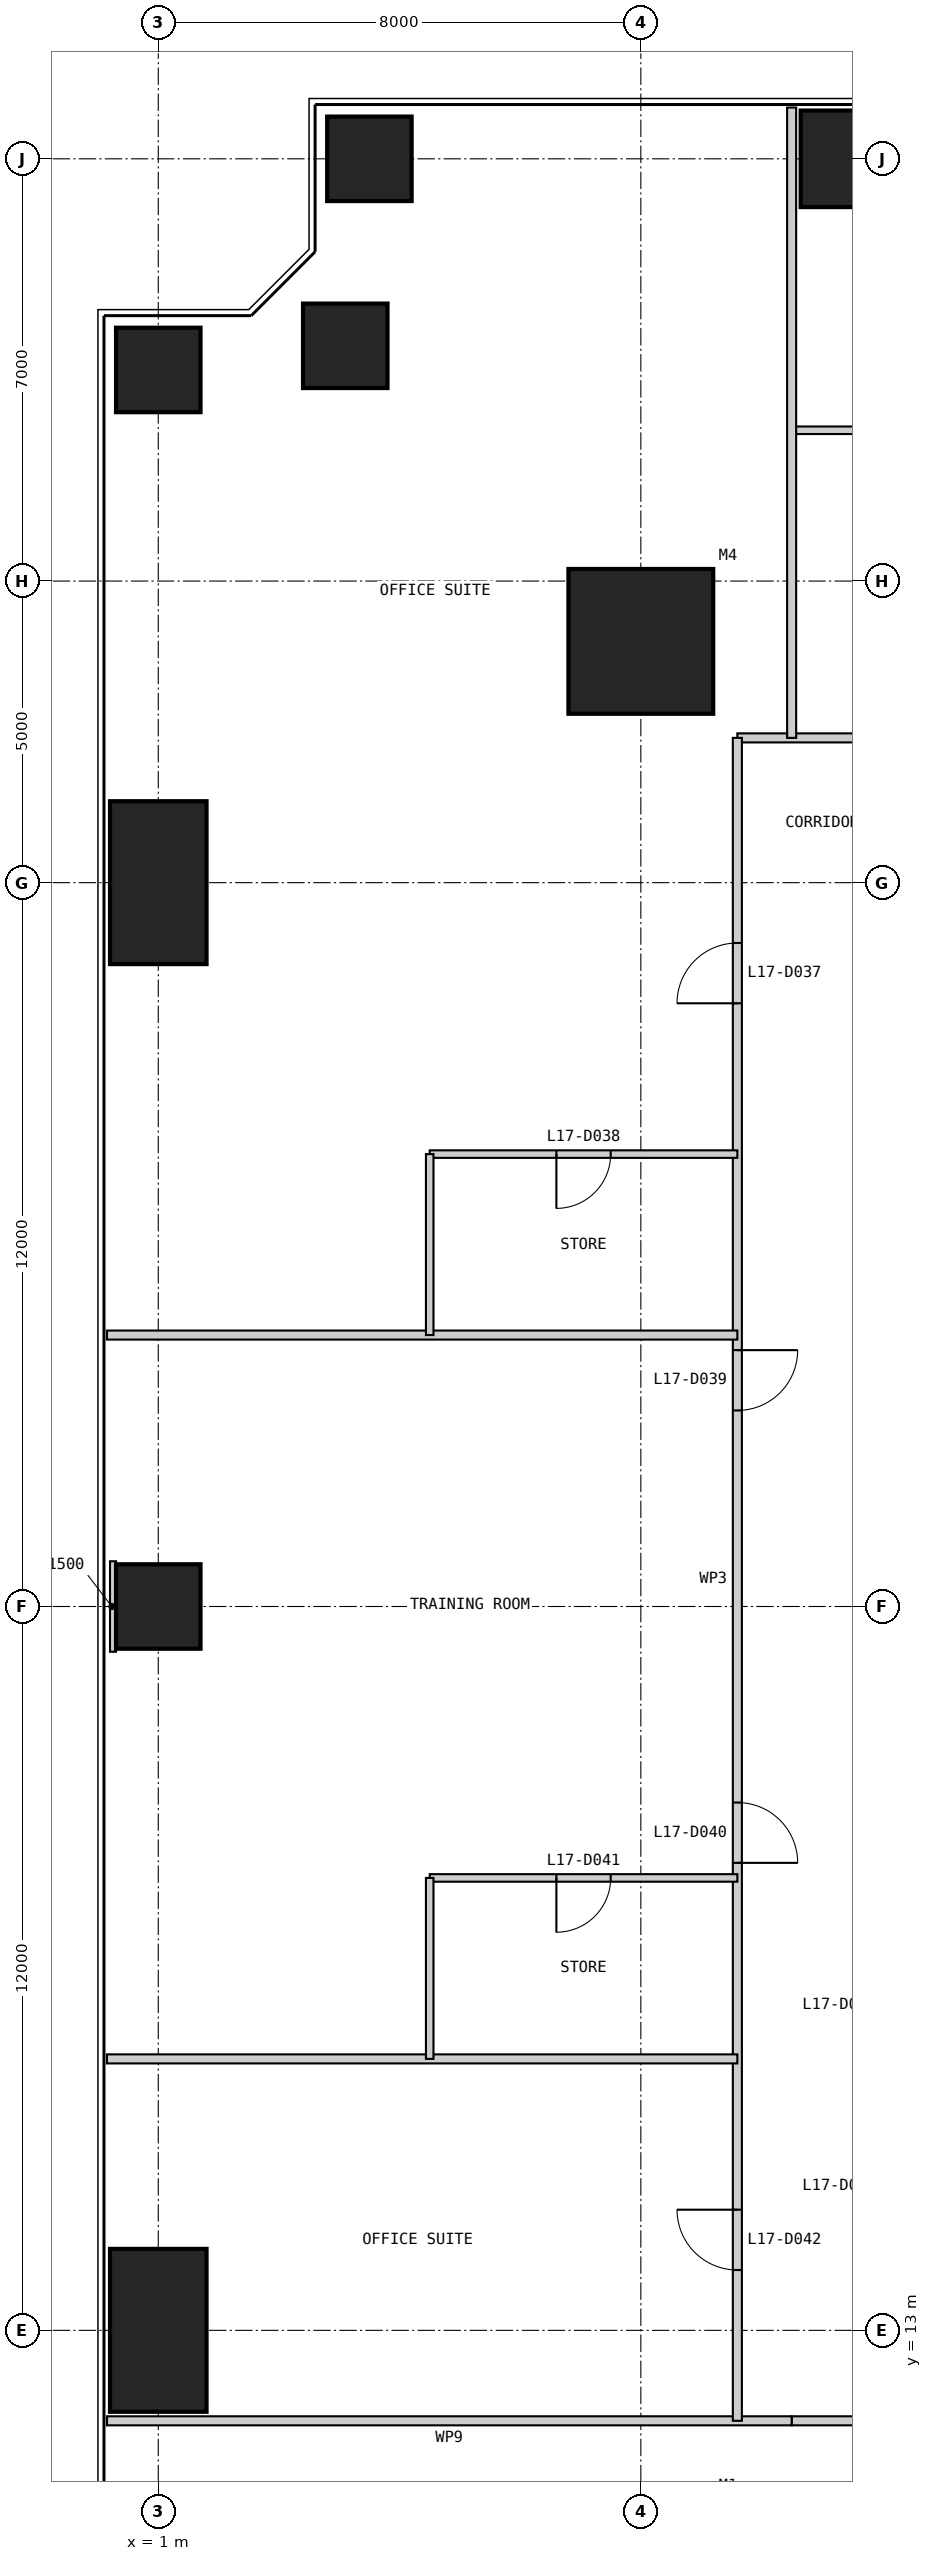
"""IFC4 building model, lengths in metres.
Left out: names, types, materials, properties, quantities, classifications, styles, units other than length and angle.
Written with IfcOpenShell. Run it as: python <this file> out.ifc"""

import sys

from ifc_helpers import new_model, si_unit, direction, frame, frame_2d, origin, origin_2d, place, context, subcontext, project, spatial, rectangle, extrude, element, fill, save


model = new_model("IFC4")
c1 = context("Model", 3, precision=1e-05, world=origin(), true_north=direction((0.0, 1.0)))
c2 = subcontext(c1, "Body", "Model", "MODEL_VIEW")
j1 = project(units=[si_unit("LENGTHUNIT", "METRE"), si_unit("PLANEANGLEUNIT", "RADIAN")], contexts=[c1])
p1 = place(None, origin())
s1 = spatial("IfcSite", under=j1, at=p1, CompositionType="ELEMENT")
p2 = place(p1, origin())
s2 = spatial("IfcBuilding", under=s1, at=p2, CompositionType="ELEMENT")
p3 = place(p2, frame((0.0, 0.0, 75.0)))
s3 = spatial("IfcBuildingStorey", under=s2, at=p3, CompositionType="ELEMENT", Elevation=75.0)
p4 = place(p3, frame((9.0, 41.0, 0.0), z_axis=(0.0, 0.0, 1.0), x_axis=(1.0, 0.0, 0.0)))
e1 = element("IfcColumn", 1, at=p4, inside=s3, PredefinedType="COLUMN", context=c2, shape_type="SweptSolid", body=[
    extrude(rectangle(XDim=2.4, YDim=2.4, at=origin_2d()), origin(), (0.0, 0.0, 1.0), 4.0),
])
p5 = place(p3, frame((13.0, 49.0, 0.0), z_axis=(0.0, 0.0, 1.0), x_axis=(1.0, 0.0, 0.0)))
e2 = element("IfcColumn", 2, at=p5, inside=s3, PredefinedType="COLUMN", context=c2, shape_type="SweptSolid", body=[
    extrude(rectangle(XDim=2.7, YDim=1.6, at=origin_2d()), origin(), (0.0, 0.0, 1.0), 4.0),
])
for number, where, z_axis, x_axis in (
    (3, (4.5, 49.0, 0.0), (0.0, 0.0, 1.0), (1.0, 0.0, 0.0)),
    (4, (4.1, 45.9, 0.0), (0.0, 0.0, 1.0), (1.0, 0.0, 0.0)),
    (5, (1.0, 45.5, 0.0), (0.0, 0.0, 1.0), (1.0, 0.0, 0.0)),
):
    element("IfcColumn", number, at=place(p3, frame(where, z_axis=z_axis, x_axis=x_axis)), inside=s3, PredefinedType="COLUMN", context=c2, shape_type="SweptSolid", body=[
        extrude(rectangle(XDim=1.4, YDim=1.4, at=origin_2d()), origin(), (0.0, 0.0, 1.0), 4.0),
    ])
p6 = place(p3, frame((1.0, 37.0, 0.0), z_axis=(0.0, 0.0, 1.0), x_axis=(1.0, 0.0, 0.0)))
e6 = element("IfcColumn", 6, at=p6, inside=s3, PredefinedType="COLUMN", context=c2, shape_type="SweptSolid", body=[
    extrude(rectangle(XDim=1.6, YDim=2.7, at=origin_2d()), origin(), (0.0, 0.0, 1.0), 4.0),
])
p7 = place(p3, frame((1.0, 25.0, 0.0), z_axis=(0.0, 0.0, 1.0), x_axis=(1.0, 0.0, 0.0)))
e7 = element("IfcColumn", 7, at=p7, inside=s3, PredefinedType="COLUMN", context=c2, shape_type="SweptSolid", body=[
    extrude(rectangle(XDim=1.4, YDim=1.4, at=origin_2d()), origin(), (0.0, 0.0, 1.0), 4.0),
])
p8 = place(p3, frame((1.0, 13.0, 0.0), z_axis=(0.0, 0.0, 1.0), x_axis=(1.0, 0.0, 0.0)))
e8 = element("IfcColumn", 8, at=p8, inside=s3, PredefinedType="COLUMN", context=c2, shape_type="SweptSolid", body=[
    extrude(rectangle(XDim=1.6, YDim=2.7, at=origin_2d()), origin(), (0.0, 0.0, 1.0), 4.0),
])
p9 = place(p3, frame((11.5, 11.5, 0.0), z_axis=(0.0, 0.0, 1.0), x_axis=(1.0, 0.0, 0.0)))
e9 = element("IfcWall", 9, at=p9, inside=s3, PredefinedType="PARTITIONING", context=c2, shape_type="SweptSolid", body=[
    extrude(rectangle(XDim=27.0, YDim=0.15, at=frame_2d((13.5, 0.0))), origin(), (0.0, 0.0, 1.0), 3.85),
])
p10 = place(p9, frame((11.5, 0.0, 0.0)))
e10 = element("IfcOpeningElement", 10, at=p10, cuts=e9, PredefinedType="OPENING", context=c2, shape_type="SweptSolid", body=[
    extrude(rectangle(XDim=1.0, YDim=2.2, at=frame_2d((0.5, 1.1))), frame((0.0, 0.085, 0.0), z_axis=(0.0, -1.0, 0.0), x_axis=(1.0, 0.0, 0.0)), (0.0, 0.0, 1.0), 0.17),
])
p11 = place(p3, frame((0.15, 11.5, 0.0), z_axis=(0.0, 0.0, 1.0), x_axis=(1.0, 0.0, 0.0)))
e11 = element("IfcWall", 11, at=p11, inside=s3, PredefinedType="PARTITIONING", context=c2, shape_type="SweptSolid", body=[
    extrude(rectangle(XDim=11.35, YDim=0.15, at=frame_2d((5.675, 0.0))), origin(), (0.0, 0.0, 1.0), 3.85),
])
p12 = place(p3, frame((39.4, 39.4, 0.0), z_axis=(0.0, 0.0, 1.0), x_axis=(-1.0, 0.0, 0.0)))
e12 = element("IfcWall", 12, at=p12, inside=s3, PredefinedType="PARTITIONING", context=c2, shape_type="SweptSolid", body=[
    extrude(rectangle(XDim=28.8, YDim=0.15, at=frame_2d((14.4, 0.0))), origin(), (0.0, 0.0, 1.0), 3.85),
])
p13 = place(p12, frame((1.15, 0.0, 0.0)))
e13 = element("IfcOpeningElement", 13, at=p13, cuts=e12, PredefinedType="OPENING", context=c2, shape_type="SweptSolid", body=[
    extrude(rectangle(XDim=1.0, YDim=2.2, at=frame_2d((0.5, 1.1))), frame((0.0, 0.085, 0.0), z_axis=(0.0, -1.0, 0.0), x_axis=(1.0, 0.0, 0.0)), (0.0, 0.0, 1.0), 0.17),
])
p14 = place(p12, frame((23.65, 0.0, 0.0)))
e14 = element("IfcOpeningElement", 14, at=p14, cuts=e12, PredefinedType="OPENING", context=c2, shape_type="SweptSolid", body=[
    extrude(rectangle(XDim=1.0, YDim=2.2, at=frame_2d((0.5, 1.1))), frame((0.0, 0.085, 0.0), z_axis=(0.0, -1.0, 0.0), x_axis=(1.0, 0.0, 0.0)), (0.0, 0.0, 1.0), 0.17),
])
p15 = place(p3, frame((29.5, 44.5, 0.0), z_axis=(0.0, 0.0, 1.0), x_axis=(-1.0, 0.0, 0.0)))
e15 = element("IfcWall", 15, at=p15, inside=s3, PredefinedType="PARTITIONING", context=c2, shape_type="SweptSolid", body=[
    extrude(rectangle(XDim=18.0, YDim=0.125, at=frame_2d((9.0, 0.0))), origin(), (0.0, 0.0, 1.0), 3.85),
])
p16 = place(p15, frame((10.0, 0.0, 0.0)))
e16 = element("IfcOpeningElement", 16, at=p16, cuts=e15, PredefinedType="OPENING", context=c2, shape_type="SweptSolid", body=[
    extrude(rectangle(XDim=1.0, YDim=2.2, at=frame_2d((0.5, 1.1))), frame((0.0, 0.073, 0.0), z_axis=(0.0, -1.0, 0.0), x_axis=(1.0, 0.0, 0.0)), (0.0, 0.0, 1.0), 0.145),
])
p17 = place(p15, frame((13.05, 0.0, 0.0)))
e17 = element("IfcOpeningElement", 17, at=p17, cuts=e15, PredefinedType="OPENING", context=c2, shape_type="SweptSolid", body=[
    extrude(rectangle(XDim=0.9, YDim=2.2, at=frame_2d((0.45, 1.1))), frame((0.0, 0.073, 0.0), z_axis=(0.0, -1.0, 0.0), x_axis=(1.0, 0.0, 0.0)), (0.0, 0.0, 1.0), 0.145),
])
p18 = place(p3, frame((10.6, 39.4, 0.0), z_axis=(0.0, 0.0, 1.0), x_axis=(0.0, -1.0, 0.0)))
e18 = element("IfcWall", 18, at=p18, inside=s3, PredefinedType="PARTITIONING", context=c2, shape_type="SweptSolid", body=[
    extrude(rectangle(XDim=27.9, YDim=0.15, at=frame_2d((13.95, 0.0))), origin(), (0.0, 0.0, 1.0), 3.85),
])
p19 = place(p18, frame((3.4, 0.0, 0.0)))
e19 = element("IfcOpeningElement", 19, at=p19, cuts=e18, PredefinedType="OPENING", context=c2, shape_type="SweptSolid", body=[
    extrude(rectangle(XDim=1.0, YDim=2.2, at=frame_2d((0.5, 1.1))), frame((0.0, 0.085, 0.0), z_axis=(0.0, -1.0, 0.0), x_axis=(1.0, 0.0, 0.0)), (0.0, 0.0, 1.0), 0.17),
])
p20 = place(p18, frame((10.15, 0.0, 0.0)))
e20 = element("IfcOpeningElement", 20, at=p20, cuts=e18, PredefinedType="OPENING", context=c2, shape_type="SweptSolid", body=[
    extrude(rectangle(XDim=1.0, YDim=2.2, at=frame_2d((0.5, 1.1))), frame((0.0, 0.085, 0.0), z_axis=(0.0, -1.0, 0.0), x_axis=(1.0, 0.0, 0.0)), (0.0, 0.0, 1.0), 0.17),
])
p21 = place(p18, frame((17.65, 0.0, 0.0)))
e21 = element("IfcOpeningElement", 21, at=p21, cuts=e18, PredefinedType="OPENING", context=c2, shape_type="SweptSolid", body=[
    extrude(rectangle(XDim=1.0, YDim=2.2, at=frame_2d((0.5, 1.1))), frame((0.0, 0.085, 0.0), z_axis=(0.0, -1.0, 0.0), x_axis=(1.0, 0.0, 0.0)), (0.0, 0.0, 1.0), 0.17),
])
p22 = place(p18, frame((24.4, 0.0, 0.0)))
e22 = element("IfcOpeningElement", 22, at=p22, cuts=e18, PredefinedType="OPENING", context=c2, shape_type="SweptSolid", body=[
    extrude(rectangle(XDim=1.0, YDim=2.2, at=frame_2d((0.5, 1.1))), frame((0.0, 0.085, 0.0), z_axis=(0.0, -1.0, 0.0), x_axis=(1.0, 0.0, 0.0)), (0.0, 0.0, 1.0), 0.17),
])
p23 = place(p3, frame((11.5, 49.85, 0.0), z_axis=(0.0, 0.0, 1.0), x_axis=(0.0, -1.0, 0.0)))
e23 = element("IfcWall", 23, at=p23, inside=s3, PredefinedType="PARTITIONING", context=c2, shape_type="SweptSolid", body=[
    extrude(rectangle(XDim=10.45, YDim=0.15, at=frame_2d((5.225, 0.0))), origin(), (0.0, 0.0, 1.0), 3.85),
])
p24 = place(p3, frame((5.5, 32.5, 0.0), z_axis=(0.0, 0.0, 1.0), x_axis=(1.0, 0.0, 0.0)))
e24 = element("IfcWall", 24, at=p24, inside=s3, PredefinedType="PARTITIONING", context=c2, shape_type="SweptSolid", body=[
    extrude(rectangle(XDim=5.1, YDim=0.125, at=frame_2d((2.55, 0.0))), origin(), (0.0, 0.0, 1.0), 3.85),
])
p25 = place(p24, frame((2.1, 0.0, 0.0)))
e25 = element("IfcOpeningElement", 25, at=p25, cuts=e24, PredefinedType="OPENING", context=c2, shape_type="SweptSolid", body=[
    extrude(rectangle(XDim=0.9, YDim=2.2, at=frame_2d((0.45, 1.1))), frame((0.0, 0.073, 0.0), z_axis=(0.0, -1.0, 0.0), x_axis=(1.0, 0.0, 0.0)), (0.0, 0.0, 1.0), 0.145),
])
p26 = place(p3, frame((0.15, 29.5, 0.0), z_axis=(0.0, 0.0, 1.0), x_axis=(1.0, 0.0, 0.0)))
e26 = element("IfcWall", 26, at=p26, inside=s3, PredefinedType="PARTITIONING", context=c2, shape_type="SweptSolid", body=[
    extrude(rectangle(XDim=10.45, YDim=0.15, at=frame_2d((5.225, 0.0))), origin(), (0.0, 0.0, 1.0), 3.85),
])
p27 = place(p3, frame((5.5, 20.5, 0.0), z_axis=(0.0, 0.0, 1.0), x_axis=(1.0, 0.0, 0.0)))
e27 = element("IfcWall", 27, at=p27, inside=s3, PredefinedType="PARTITIONING", context=c2, shape_type="SweptSolid", body=[
    extrude(rectangle(XDim=5.1, YDim=0.125, at=frame_2d((2.55, 0.0))), origin(), (0.0, 0.0, 1.0), 3.85),
])
p28 = place(p27, frame((2.1, 0.0, 0.0)))
e28 = element("IfcOpeningElement", 28, at=p28, cuts=e27, PredefinedType="OPENING", context=c2, shape_type="SweptSolid", body=[
    extrude(rectangle(XDim=0.9, YDim=2.2, at=frame_2d((0.45, 1.1))), frame((0.0, 0.073, 0.0), z_axis=(0.0, -1.0, 0.0), x_axis=(1.0, 0.0, 0.0)), (0.0, 0.0, 1.0), 0.145),
])
p29 = place(p3, frame((0.15, 17.5, 0.0), z_axis=(0.0, 0.0, 1.0), x_axis=(1.0, 0.0, 0.0)))
e29 = element("IfcWall", 29, at=p29, inside=s3, PredefinedType="PARTITIONING", context=c2, shape_type="SweptSolid", body=[
    extrude(rectangle(XDim=10.45, YDim=0.15, at=frame_2d((5.225, 0.0))), origin(), (0.0, 0.0, 1.0), 3.85),
])
for number, where, z_axis, x_axis in (
    (30, (5.5, 32.5, 0.0), (0.0, 0.0, 1.0), (0.0, -1.0, 0.0)),
    (31, (5.5, 20.5, 0.0), (0.0, 0.0, 1.0), (0.0, -1.0, 0.0)),
):
    element("IfcWall", number, at=place(p3, frame(where, z_axis=z_axis, x_axis=x_axis)), inside=s3, PredefinedType="PARTITIONING", context=c2, shape_type="SweptSolid", body=[
        extrude(rectangle(XDim=3.0, YDim=0.125, at=frame_2d((1.5, 0.0))), origin(), (0.0, 0.0, 1.0), 3.85),
    ])
p30 = place(p3, frame((0.2, 25.0, 0.0), z_axis=(0.0, 0.0, 1.0), x_axis=(1.0, 0.0, 0.0)))
e32 = element("IfcWall", 32, at=p30, inside=s3, PredefinedType="PARTITIONING", context=c2, shape_type="SweptSolid", body=[
    extrude(rectangle(XDim=0.1, YDim=1.5, at=frame_2d((0.05, 0.0))), origin(), (0.0, 0.0, 1.0), 3.85),
])
p31 = place(p19, frame((1.0, 0.0, 0.0), z_axis=(0.0, 0.0, 1.0), x_axis=(-1.0, 0.0, 0.0)))
e33 = element("IfcDoor", 33, at=p31, inside=s3, OperationType="SINGLE_SWING_LEFT", PredefinedType="DOOR", context=c2, shape_type="SweptSolid", body=[
    extrude(rectangle(XDim=1.0, YDim=2.2, at=frame_2d((0.5, 1.1))), frame((0.0, 0.025, 0.0), z_axis=(0.0, -1.0, 0.0), x_axis=(1.0, 0.0, 0.0)), (0.0, 0.0, 1.0), 0.05),
])
fill(e19, e33)
p32 = place(p25, frame((0.9, 0.0, 0.0), z_axis=(0.0, 0.0, 1.0), x_axis=(-1.0, 0.0, 0.0)))
e34 = element("IfcDoor", 34, at=p32, inside=s3, OperationType="SINGLE_SWING_RIGHT", PredefinedType="DOOR", context=c2, shape_type="SweptSolid", body=[
    extrude(rectangle(XDim=0.9, YDim=2.2, at=frame_2d((0.45, 1.1))), frame((0.0, 0.025, 0.0), z_axis=(0.0, -1.0, 0.0), x_axis=(1.0, 0.0, 0.0)), (0.0, 0.0, 1.0), 0.05),
])
fill(e25, e34)
p33 = place(p20, origin())
e35 = element("IfcDoor", 35, at=p33, inside=s3, OperationType="SINGLE_SWING_LEFT", PredefinedType="DOOR", context=c2, shape_type="SweptSolid", body=[
    extrude(rectangle(XDim=1.0, YDim=2.2, at=frame_2d((0.5, 1.1))), frame((0.0, 0.025, 0.0), z_axis=(0.0, -1.0, 0.0), x_axis=(1.0, 0.0, 0.0)), (0.0, 0.0, 1.0), 0.05),
])
fill(e20, e35)
p34 = place(p21, origin())
e36 = element("IfcDoor", 36, at=p34, inside=s3, OperationType="SINGLE_SWING_RIGHT", PredefinedType="DOOR", context=c2, shape_type="SweptSolid", body=[
    extrude(rectangle(XDim=1.0, YDim=2.2, at=frame_2d((0.5, 1.1))), frame((0.0, 0.025, 0.0), z_axis=(0.0, -1.0, 0.0), x_axis=(1.0, 0.0, 0.0)), (0.0, 0.0, 1.0), 0.05),
])
fill(e21, e36)
p35 = place(p28, frame((0.9, 0.0, 0.0), z_axis=(0.0, 0.0, 1.0), x_axis=(-1.0, 0.0, 0.0)))
e37 = element("IfcDoor", 37, at=p35, inside=s3, OperationType="SINGLE_SWING_RIGHT", PredefinedType="DOOR", context=c2, shape_type="SweptSolid", body=[
    extrude(rectangle(XDim=0.9, YDim=2.2, at=frame_2d((0.45, 1.1))), frame((0.0, 0.025, 0.0), z_axis=(0.0, -1.0, 0.0), x_axis=(1.0, 0.0, 0.0)), (0.0, 0.0, 1.0), 0.05),
])
fill(e28, e37)
p36 = place(p22, frame((1.0, 0.0, 0.0), z_axis=(0.0, 0.0, 1.0), x_axis=(-1.0, 0.0, 0.0)))
e38 = element("IfcDoor", 38, at=p36, inside=s3, OperationType="SINGLE_SWING_RIGHT", PredefinedType="DOOR", context=c2, shape_type="SweptSolid", body=[
    extrude(rectangle(XDim=1.0, YDim=2.2, at=frame_2d((0.5, 1.1))), frame((0.0, 0.025, 0.0), z_axis=(0.0, -1.0, 0.0), x_axis=(1.0, 0.0, 0.0)), (0.0, 0.0, 1.0), 0.05),
])
fill(e22, e38)
save(model, sys.argv[1])
